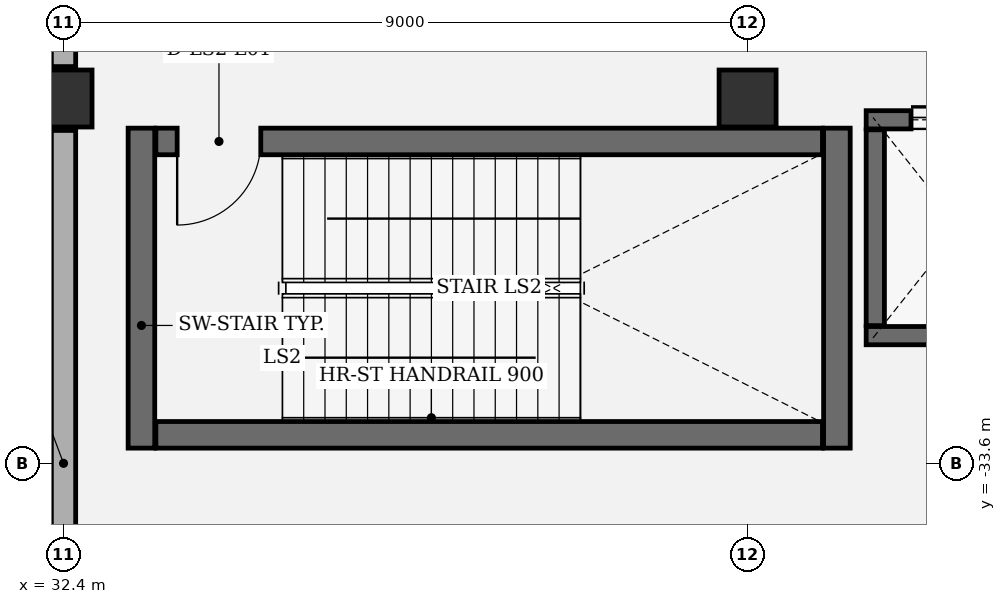
"""IFC4 building model, lengths in metres.
Left out: names, types, materials, properties, quantities, classifications, styles, units other than length and angle.
Written with IfcOpenShell. Run it as: python <this file> out.ifc"""

import sys

from ifc_helpers import new_model, si_unit, direction, frame, frame_2d, origin, origin_2d, place, context, subcontext, project, spatial, rectangle, extrude, element, fill, save


model = new_model("IFC4")
c1 = context("Model", 3, precision=1e-05, world=origin(), true_north=direction((0.0, 1.0)))
c2 = subcontext(c1, "Body", "Model", "MODEL_VIEW")
j1 = project(units=[si_unit("LENGTHUNIT", "METRE"), si_unit("PLANEANGLEUNIT", "RADIAN")], contexts=[c1])
p1 = place(None, origin())
s1 = spatial("IfcSite", under=j1, at=p1, CompositionType="ELEMENT")
p2 = place(p1, origin())
s2 = spatial("IfcBuilding", under=s1, at=p2, CompositionType="ELEMENT")
p3 = place(p2, frame((0.0, 0.0, 6.6)))
s3 = spatial("IfcBuildingStorey", under=s2, at=p3, CompositionType="ELEMENT", Elevation=6.6)
for number, where, z_axis, x_axis in (
    (1, (32.4, -28.8, 0.0), (0.0, 0.0, 1.0), (1.0, 0.0, 0.0)),
    (2, (41.4, -28.8, 0.0), (0.0, 0.0, 1.0), (1.0, 0.0, 0.0)),
):
    element("IfcColumn", number, at=place(p3, frame(where, z_axis=z_axis, x_axis=x_axis)), inside=s3, PredefinedType="COLUMN", context=c2, shape_type="SweptSolid", body=[
        extrude(rectangle(XDim=0.75, YDim=0.75, at=origin_2d()), origin(), (0.0, 0.0, 1.0), 5.4),
    ])
p4 = place(p3, frame((32.4, -37.98, 0.0), z_axis=(0.0, 0.0, 1.0), x_axis=(0.0, 1.0, 0.0)))
e3 = element("IfcWall", 3, at=p4, inside=s3, PredefinedType="SOLIDWALL", context=c2, shape_type="SweptSolid", body=[
    extrude(rectangle(XDim=8.76, YDim=0.32, at=frame_2d((4.38, 0.0))), origin(), (0.0, 0.0, 1.0), 4.337),
])
p5 = place(p3, frame((32.4, -28.38, 0.0), z_axis=(0.0, 0.0, 1.0), x_axis=(0.0, 1.0, 0.0)))
e4 = element("IfcWall", 4, at=p5, inside=s3, PredefinedType="SOLIDWALL", context=c2, shape_type="SweptSolid", body=[
    extrude(rectangle(XDim=8.76, YDim=0.32, at=frame_2d((4.38, 0.0))), origin(), (0.0, 0.0, 1.0), 4.337),
])
for number, where, z_axis, x_axis in (
    (5, (33.425, -29.19, 0.0), (0.0, 0.0, 1.0), (0.0, -1.0, 0.0)),
    (6, (42.575, -33.4, 0.0), (0.0, 0.0, 1.0), (0.0, 1.0, 0.0)),
):
    element("IfcWall", number, at=place(p3, frame(where, z_axis=z_axis, x_axis=x_axis)), inside=s3, PredefinedType="SHEAR", context=c2, shape_type="SweptSolid", body=[
        extrude(rectangle(XDim=4.21, YDim=0.35, at=frame_2d((2.105, 0.0))), origin(), (0.0, 0.0, 1.0), 5.395),
    ])
p6 = place(p3, frame((33.615, -33.225, 0.0), z_axis=(0.0, 0.0, 1.0), x_axis=(1.0, 0.0, 0.0)))
e7 = element("IfcWall", 7, at=p6, inside=s3, PredefinedType="SHEAR", context=c2, shape_type="SweptSolid", body=[
    extrude(rectangle(XDim=8.77, YDim=0.35, at=frame_2d((4.385, 0.0))), origin(), (0.0, 0.0, 1.0), 5.395),
])
p7 = place(p3, frame((42.385, -29.365, 0.0), z_axis=(0.0, 0.0, 1.0), x_axis=(-1.0, 0.0, 0.0)))
e8 = element("IfcWall", 8, at=p7, inside=s3, PredefinedType="SHEAR", context=c2, shape_type="SweptSolid", body=[
    extrude(rectangle(XDim=8.77, YDim=0.35, at=frame_2d((4.385, 0.0))), origin(), (0.0, 0.0, 1.0), 5.395),
])
p8 = place(p7, frame((7.39, 0.0, 0.0)))
e9 = element("IfcOpeningElement", 9, at=p8, cuts=e8, PredefinedType="OPENING", context=c2, shape_type="SweptSolid", body=[
    extrude(rectangle(XDim=1.1, YDim=2.2, at=frame_2d((0.55, 1.1))), frame((0.0, 0.185, 0.0), z_axis=(0.0, -1.0, 0.0), x_axis=(1.0, 0.0, 0.0)), (0.0, 0.0, 1.0), 0.37),
])
p9 = place(p3, frame((45.44, -31.92, 0.0), z_axis=(0.0, 0.0, 1.0), x_axis=(-1.0, 0.0, 0.0)))
e10 = element("IfcWall", 10, at=p9, inside=s3, PredefinedType="SHEAR", context=c2, shape_type="SweptSolid", body=[
    extrude(rectangle(XDim=2.48, YDim=0.24, at=frame_2d((1.24, 0.0))), origin(), (0.0, 0.0, 1.0), 5.14),
])
p10 = place(p3, frame((42.96, -29.08, 0.0), z_axis=(0.0, 0.0, 1.0), x_axis=(1.0, 0.0, 0.0)))
e11 = element("IfcWall", 11, at=p10, inside=s3, PredefinedType="SHEAR", context=c2, shape_type="SweptSolid", body=[
    extrude(rectangle(XDim=2.48, YDim=0.24, at=frame_2d((1.24, 0.0))), origin(), (0.0, 0.0, 1.0), 5.14),
])
p11 = place(p10, frame((0.59, 0.0, 0.0)))
e12 = element("IfcOpeningElement", 12, at=p11, cuts=e11, PredefinedType="OPENING", context=c2, shape_type="SweptSolid", body=[
    extrude(rectangle(XDim=1.3, YDim=2.3, at=frame_2d((0.65, 1.15))), frame((0.0, 0.13, 0.0), z_axis=(0.0, -1.0, 0.0), x_axis=(1.0, 0.0, 0.0)), (0.0, 0.0, 1.0), 0.26),
])
p12 = place(p3, frame((43.08, -31.788, 0.0), z_axis=(0.0, 0.0, 1.0), x_axis=(0.0, 1.0, 0.0)))
e13 = element("IfcWall", 13, at=p12, inside=s3, PredefinedType="SHEAR", context=c2, shape_type="SweptSolid", body=[
    extrude(rectangle(XDim=2.576, YDim=0.24, at=frame_2d((1.288, 0.0))), origin(), (0.0, 0.0, 1.0), 5.14),
])
p13 = place(p8, origin())
e14 = element("IfcDoor", 14, at=p13, inside=s3, OperationType="SINGLE_SWING_RIGHT", PredefinedType="DOOR", context=c2, shape_type="SweptSolid", body=[
    extrude(rectangle(XDim=1.1, YDim=2.2, at=frame_2d((0.55, 1.1))), frame((0.0, 0.025, 0.0), z_axis=(0.0, -1.0, 0.0), x_axis=(1.0, 0.0, 0.0)), (0.0, 0.0, 1.0), 0.05),
])
fill(e9, e14)
p14 = place(p11, origin())
e15 = element("IfcDoor", 15, at=p14, inside=s3, OperationType="DOUBLE_DOOR_SLIDING", PredefinedType="DOOR", context=c2, shape_type="SweptSolid", body=[
    extrude(rectangle(XDim=1.3, YDim=2.3, at=frame_2d((0.65, 1.15))), frame((0.0, 0.025, 0.0), z_axis=(0.0, -1.0, 0.0), x_axis=(1.0, 0.0, 0.0)), (0.0, 0.0, 1.0), 0.05),
])
fill(e12, e15)
save(model, sys.argv[1])
